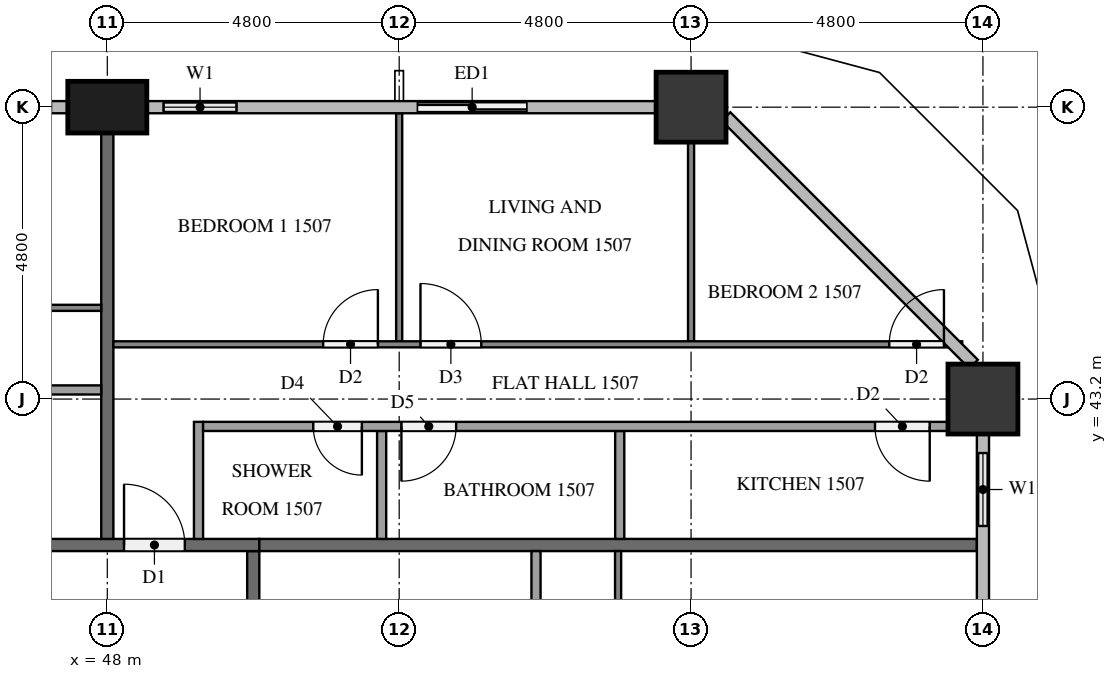
"""IFC4 building model, lengths in metres.
Left out: names, types, materials, properties, quantities, classifications, styles, units other than length and angle.
Written with IfcOpenShell. Run it as: python <this file> out.ifc"""

import sys

from ifc_helpers import new_model, si_unit, direction, frame, frame_2d, origin, origin_2d, place, context, subcontext, project, spatial, rectangle, extrude, element, fill, save


model = new_model("IFC4")
c1 = context("Model", 3, precision=1e-05, world=origin(), true_north=direction((0.0, 1.0)))
c2 = subcontext(c1, "Body", "Model", "MODEL_VIEW")
j1 = project(units=[si_unit("LENGTHUNIT", "METRE"), si_unit("PLANEANGLEUNIT", "RADIAN")], contexts=[c1])
p1 = place(None, origin())
s1 = spatial("IfcSite", under=j1, at=p1, CompositionType="ELEMENT")
p2 = place(p1, origin())
s2 = spatial("IfcBuilding", under=s1, at=p2, CompositionType="ELEMENT")
p3 = place(p2, frame((0.0, 0.0, 62.8)))
s3 = spatial("IfcBuildingStorey", under=s2, at=p3, CompositionType="ELEMENT", Elevation=62.8)
for number, where, z_axis, x_axis in (
    (1, (62.4, 43.2, 0.0), (0.0, 0.0, 1.0), (1.0, 0.0, 0.0)),
    (2, (57.6, 48.0, 0.0), (0.0, 0.0, 1.0), (1.0, 0.0, 0.0)),
):
    element("IfcColumn", number, at=place(p3, frame(where, z_axis=z_axis, x_axis=x_axis)), inside=s3, PredefinedType="COLUMN", context=c2, shape_type="SweptSolid", body=[
        extrude(rectangle(XDim=1.15, YDim=1.15, at=origin_2d()), origin(), (0.0, 0.0, 1.0), 3.2),
    ])
p4 = place(p3, frame((48.0, 48.0, 0.0), z_axis=(0.0, 0.0, 1.0), x_axis=(1.0, 0.0, 0.0)))
e3 = element("IfcColumn", 3, at=p4, inside=s3, PredefinedType="COLUMN", context=c2, shape_type="SweptSolid", body=[
    extrude(rectangle(XDim=1.3, YDim=0.85, at=origin_2d()), origin(), (0.0, 0.0, 1.0), 3.2),
])
p5 = place(p3, frame((62.4, 40.8, 0.0), z_axis=(0.0, 0.0, 1.0), x_axis=(0.0, 1.0, 0.0)))
e4 = element("IfcWall", 4, at=p5, inside=s3, PredefinedType="SOLIDWALL", context=c2, shape_type="SweptSolid", body=[
    extrude(rectangle(XDim=1.825, YDim=0.15, at=frame_2d((0.913, 0.0))), origin(), (0.0, 0.0, 1.0), 3.2),
])
p6 = place(p5, frame((0.312, 0.0, 0.9)))
e5 = element("IfcOpeningElement", 5, at=p6, cuts=e4, PredefinedType="OPENING", context=c2, shape_type="SweptSolid", body=[
    extrude(rectangle(XDim=1.2, YDim=1.4, at=frame_2d((0.6, 0.7))), frame((0.0, 0.085, 0.0), z_axis=(0.0, -1.0, 0.0), x_axis=(1.0, 0.0, 0.0)), (0.0, 0.0, 1.0), 0.17),
])
p7 = place(p3, frame((55.2, 48.0, 0.0), z_axis=(0.0, 0.0, 1.0), x_axis=(-1.0, 0.0, 0.0)))
e6 = element("IfcWall", 6, at=p7, inside=s3, PredefinedType="SOLIDWALL", context=c2, shape_type="SweptSolid", body=[
    extrude(rectangle(XDim=2.4, YDim=0.15, at=frame_2d((1.2, 0.0))), origin(), (0.0, 0.0, 1.0), 3.2),
])
p8 = place(p7, frame((0.3, 0.0, 0.0)))
e7 = element("IfcOpeningElement", 7, at=p8, cuts=e6, PredefinedType="OPENING", context=c2, shape_type="SweptSolid", body=[
    extrude(rectangle(XDim=1.8, YDim=2.4, at=frame_2d((0.9, 1.2))), frame((0.0, 0.085, 0.0), z_axis=(0.0, -1.0, 0.0), x_axis=(1.0, 0.0, 0.0)), (0.0, 0.0, 1.0), 0.17),
])
p9 = place(p3, frame((50.4, 48.0, 0.0), z_axis=(0.0, 0.0, 1.0), x_axis=(-1.0, 0.0, 0.0)))
e8 = element("IfcWall", 8, at=p9, inside=s3, PredefinedType="SOLIDWALL", context=c2, shape_type="SweptSolid", body=[
    extrude(rectangle(XDim=1.75, YDim=0.15, at=frame_2d((0.875, 0.0))), origin(), (0.0, 0.0, 1.0), 3.2),
])
p10 = place(p9, frame((0.275, 0.0, 0.9)))
e9 = element("IfcOpeningElement", 9, at=p10, cuts=e8, PredefinedType="OPENING", context=c2, shape_type="SweptSolid", body=[
    extrude(rectangle(XDim=1.2, YDim=1.4, at=frame_2d((0.6, 0.7))), frame((0.0, 0.085, 0.0), z_axis=(0.0, -1.0, 0.0), x_axis=(1.0, 0.0, 0.0)), (0.0, 0.0, 1.0), 0.17),
])
p11 = place(p3, frame((47.35, 48.0, 0.0), z_axis=(0.0, 0.0, 1.0), x_axis=(-1.0, 0.0, 0.0)))
e10 = element("IfcWall", 10, at=p11, inside=s3, PredefinedType="SOLIDWALL", context=c2, shape_type="SweptSolid", body=[
    extrude(rectangle(XDim=1.75, YDim=0.15, at=frame_2d((0.875, 0.0))), origin(), (0.0, 0.0, 1.0), 3.2),
])
p12 = place(p11, frame((0.275, 0.0, 0.9)))
e11 = element("IfcOpeningElement", 11, at=p12, cuts=e10, PredefinedType="OPENING", context=c2, shape_type="SweptSolid", body=[
    extrude(rectangle(XDim=1.2, YDim=1.4, at=frame_2d((0.6, 0.7))), frame((0.0, 0.085, 0.0), z_axis=(0.0, -1.0, 0.0), x_axis=(1.0, 0.0, 0.0)), (0.0, 0.0, 1.0), 0.17),
])
p13 = place(p3, frame((50.4, 40.7, 0.0), z_axis=(0.0, 0.0, 1.0), x_axis=(0.0, -1.0, 0.0)))
e12 = element("IfcWall", 12, at=p13, inside=s3, PredefinedType="PARTITIONING", context=c2, shape_type="SweptSolid", body=[
    extrude(rectangle(XDim=28.6, YDim=0.2, at=frame_2d((14.3, 0.0))), origin(), (0.0, 0.0, 1.0), 3.2),
])
p14 = place(p13, frame((24.175, 0.0, 0.0)))
e13 = element("IfcOpeningElement", 13, at=p14, cuts=e12, PredefinedType="OPENING", context=c2, shape_type="SweptSolid", body=[
    extrude(rectangle(XDim=1.0, YDim=2.1, at=frame_2d((0.5, 1.05))), frame((0.0, 0.11, 0.0), z_axis=(0.0, -1.0, 0.0), x_axis=(1.0, 0.0, 0.0)), (0.0, 0.0, 1.0), 0.22),
])
p15 = place(p13, frame((22.625, 0.0, 0.0)))
e14 = element("IfcOpeningElement", 14, at=p15, cuts=e12, PredefinedType="OPENING", context=c2, shape_type="SweptSolid", body=[
    extrude(rectangle(XDim=1.0, YDim=2.1, at=frame_2d((0.5, 1.05))), frame((0.0, 0.11, 0.0), z_axis=(0.0, -1.0, 0.0), x_axis=(1.0, 0.0, 0.0)), (0.0, 0.0, 1.0), 0.22),
])
p16 = place(p13, frame((10.625, 0.0, 0.0)))
e15 = element("IfcOpeningElement", 15, at=p16, cuts=e12, PredefinedType="OPENING", context=c2, shape_type="SweptSolid", body=[
    extrude(rectangle(XDim=1.0, YDim=2.1, at=frame_2d((0.5, 1.05))), frame((0.0, 0.11, 0.0), z_axis=(0.0, -1.0, 0.0), x_axis=(1.0, 0.0, 0.0)), (0.0, 0.0, 1.0), 0.22),
])
p17 = place(p3, frame((11.9, 40.8, 0.0), z_axis=(0.0, 0.0, 1.0), x_axis=(1.0, 0.0, 0.0)))
e16 = element("IfcWall", 16, at=p17, inside=s3, PredefinedType="PARTITIONING", context=c2, shape_type="SweptSolid", body=[
    extrude(rectangle(XDim=38.6, YDim=0.2, at=frame_2d((19.3, 0.0))), origin(), (0.0, 0.0, 1.0), 3.2),
])
p18 = place(p17, frame((36.375, 0.0, 0.0)))
e17 = element("IfcOpeningElement", 17, at=p18, cuts=e16, PredefinedType="OPENING", context=c2, shape_type="SweptSolid", body=[
    extrude(rectangle(XDim=1.0, YDim=2.1, at=frame_2d((0.5, 1.05))), frame((0.0, 0.11, 0.0), z_axis=(0.0, -1.0, 0.0), x_axis=(1.0, 0.0, 0.0)), (0.0, 0.0, 1.0), 0.22),
])
p19 = place(p17, frame((17.125, 0.0, 0.0)))
e18 = element("IfcOpeningElement", 18, at=p19, cuts=e16, PredefinedType="OPENING", context=c2, shape_type="SweptSolid", body=[
    extrude(rectangle(XDim=1.1, YDim=2.1, at=frame_2d((0.55, 1.05))), frame((0.0, 0.11, 0.0), z_axis=(0.0, -1.0, 0.0), x_axis=(1.0, 0.0, 0.0)), (0.0, 0.0, 1.0), 0.22),
])
p20 = place(p17, frame((15.625, 0.0, 0.0)))
e19 = element("IfcOpeningElement", 19, at=p20, cuts=e16, PredefinedType="OPENING", context=c2, shape_type="SweptSolid", body=[
    extrude(rectangle(XDim=1.0, YDim=2.1, at=frame_2d((0.5, 1.05))), frame((0.0, 0.11, 0.0), z_axis=(0.0, -1.0, 0.0), x_axis=(1.0, 0.0, 0.0)), (0.0, 0.0, 1.0), 0.22),
])
p21 = place(p17, frame((1.225, 0.0, 0.0)))
e20 = element("IfcOpeningElement", 20, at=p21, cuts=e16, PredefinedType="OPENING", context=c2, shape_type="SweptSolid", body=[
    extrude(rectangle(XDim=1.0, YDim=2.1, at=frame_2d((0.5, 1.05))), frame((0.0, 0.11, 0.0), z_axis=(0.0, -1.0, 0.0), x_axis=(1.0, 0.0, 0.0)), (0.0, 0.0, 1.0), 0.22),
])
p22 = place(p3, frame((50.5, 40.8, 0.0), z_axis=(0.0, 0.0, 1.0), x_axis=(1.0, 0.0, 0.0)))
e21 = element("IfcWall", 21, at=p22, inside=s3, PredefinedType="PARTITIONING", context=c2, shape_type="SweptSolid", body=[
    extrude(rectangle(XDim=11.8, YDim=0.2, at=frame_2d((5.9, 0.0))), origin(), (0.0, 0.0, 1.0), 3.2),
])
p23 = place(p3, frame((48.0, 47.575, 0.0), z_axis=(0.0, 0.0, 1.0), x_axis=(0.0, -1.0, 0.0)))
e22 = element("IfcWall", 22, at=p23, inside=s3, PredefinedType="PARTITIONING", context=c2, shape_type="SweptSolid", body=[
    extrude(rectangle(XDim=6.675, YDim=0.2, at=frame_2d((3.337, 0.0))), origin(), (0.0, 0.0, 1.0), 3.2),
])
p24 = place(p3, frame((56.4, 40.7, 0.0), z_axis=(0.0, 0.0, 1.0), x_axis=(0.0, -1.0, 0.0)))
e23 = element("IfcWall", 23, at=p24, inside=s3, PredefinedType="PARTITIONING", context=c2, shape_type="SweptSolid", body=[
    extrude(rectangle(XDim=11.8, YDim=0.1, at=frame_2d((5.9, 0.0))), origin(), (0.0, 0.0, 1.0), 3.2),
])
p25 = place(p24, frame((5.05, 0.0, 0.0)))
e24 = element("IfcOpeningElement", 24, at=p25, cuts=e23, PredefinedType="OPENING", context=c2, shape_type="SweptSolid", body=[
    extrude(rectangle(XDim=1.0, YDim=2.1, at=frame_2d((0.5, 1.05))), frame((0.0, 0.06, 0.0), z_axis=(0.0, -1.0, 0.0), x_axis=(1.0, 0.0, 0.0)), (0.0, 0.0, 1.0), 0.12),
])
p26 = place(p24, frame((3.45, 0.0, 0.0)))
e25 = element("IfcOpeningElement", 25, at=p26, cuts=e23, PredefinedType="OPENING", context=c2, shape_type="SweptSolid", body=[
    extrude(rectangle(XDim=0.9, YDim=2.1, at=frame_2d((0.45, 1.05))), frame((0.0, 0.06, 0.0), z_axis=(0.0, -1.0, 0.0), x_axis=(1.0, 0.0, 0.0)), (0.0, 0.0, 1.0), 0.12),
])
p27 = place(p3, frame((55.05, 30.375, 0.0), z_axis=(0.0, 0.0, 1.0), x_axis=(0.0, 1.0, 0.0)))
e26 = element("IfcWall", 26, at=p27, inside=s3, PredefinedType="PARTITIONING", context=c2, shape_type="SweptSolid", body=[
    extrude(rectangle(XDim=10.325, YDim=0.15, at=frame_2d((5.163, 0.0))), origin(), (0.0, 0.0, 1.0), 3.2),
])
p28 = place(p27, frame((3.005, 0.0, 0.0)))
e27 = element("IfcOpeningElement", 27, at=p28, cuts=e26, PredefinedType="OPENING", context=c2, shape_type="SweptSolid", body=[
    extrude(rectangle(XDim=0.8, YDim=2.1, at=frame_2d((0.4, 1.05))), frame((0.0, 0.085, 0.0), z_axis=(0.0, -1.0, 0.0), x_axis=(1.0, 0.0, 0.0)), (0.0, 0.0, 1.0), 0.17),
])
p29 = place(p27, frame((4.455, 0.0, 0.0)))
e28 = element("IfcOpeningElement", 28, at=p29, cuts=e26, PredefinedType="OPENING", context=c2, shape_type="SweptSolid", body=[
    extrude(rectangle(XDim=0.9, YDim=2.1, at=frame_2d((0.45, 1.05))), frame((0.0, 0.085, 0.0), z_axis=(0.0, -1.0, 0.0), x_axis=(1.0, 0.0, 0.0)), (0.0, 0.0, 1.0), 0.17),
])
p30 = place(p3, frame((52.8, 44.15, 0.0), z_axis=(0.0, 0.0, 1.0), x_axis=(0.0, 1.0, 0.0)))
e29 = element("IfcWall", 29, at=p30, inside=s3, PredefinedType="PARTITIONING", context=c2, shape_type="SweptSolid", body=[
    extrude(rectangle(XDim=3.75, YDim=0.1, at=frame_2d((1.875, 0.0))), origin(), (0.0, 0.0, 1.0), 3.2),
])
p31 = place(p3, frame((57.6, 44.15, 0.0), z_axis=(0.0, 0.0, 1.0), x_axis=(0.0, 1.0, 0.0)))
e30 = element("IfcWall", 30, at=p31, inside=s3, PredefinedType="PARTITIONING", context=c2, shape_type="SweptSolid", body=[
    extrude(rectangle(XDim=3.275, YDim=0.1, at=frame_2d((1.638, 0.0))), origin(), (0.0, 0.0, 1.0), 3.2),
])
p32 = place(p3, frame((48.1, 44.1, 0.0), z_axis=(0.0, 0.0, 1.0), x_axis=(1.0, 0.0, 0.0)))
e31 = element("IfcWall", 31, at=p32, inside=s3, PredefinedType="PARTITIONING", context=c2, shape_type="SweptSolid", body=[
    extrude(rectangle(XDim=13.959, YDim=0.1, at=frame_2d((6.979, 0.0))), origin(), (0.0, 0.0, 1.0), 3.2),
])
p33 = place(p32, frame((3.45, 0.0, 0.0)))
e32 = element("IfcOpeningElement", 32, at=p33, cuts=e31, PredefinedType="OPENING", context=c2, shape_type="SweptSolid", body=[
    extrude(rectangle(XDim=0.9, YDim=2.1, at=frame_2d((0.45, 1.05))), frame((0.0, 0.06, 0.0), z_axis=(0.0, -1.0, 0.0), x_axis=(1.0, 0.0, 0.0)), (0.0, 0.0, 1.0), 0.12),
])
p34 = place(p32, frame((5.05, 0.0, 0.0)))
e33 = element("IfcOpeningElement", 33, at=p34, cuts=e31, PredefinedType="OPENING", context=c2, shape_type="SweptSolid", body=[
    extrude(rectangle(XDim=1.0, YDim=2.1, at=frame_2d((0.5, 1.05))), frame((0.0, 0.06, 0.0), z_axis=(0.0, -1.0, 0.0), x_axis=(1.0, 0.0, 0.0)), (0.0, 0.0, 1.0), 0.12),
])
p35 = place(p32, frame((12.759, 0.0, 0.0)))
e34 = element("IfcOpeningElement", 34, at=p35, cuts=e31, PredefinedType="OPENING", context=c2, shape_type="SweptSolid", body=[
    extrude(rectangle(XDim=0.9, YDim=2.1, at=frame_2d((0.45, 1.05))), frame((0.0, 0.06, 0.0), z_axis=(0.0, -1.0, 0.0), x_axis=(1.0, 0.0, 0.0)), (0.0, 0.0, 1.0), 0.12),
])
for number, where, z_axis, x_axis in (
    (35, (52.511, 40.9, 0.0), (0.0, 0.0, 1.0), (0.0, 1.0, 0.0)),
    (36, (56.427, 40.9, 0.0), (0.0, 0.0, 1.0), (0.0, 1.0, 0.0)),
):
    element("IfcWall", number, at=place(p3, frame(where, z_axis=z_axis, x_axis=x_axis)), inside=s3, PredefinedType="PARTITIONING", context=c2, shape_type="SweptSolid", body=[
        extrude(rectangle(XDim=1.775, YDim=0.15, at=frame_2d((0.888, 0.0))), origin(), (0.0, 0.0, 1.0), 3.2),
    ])
p36 = place(p3, frame((49.5, 40.9, 0.0), z_axis=(0.0, 0.0, 1.0), x_axis=(0.0, 1.0, 0.0)))
e37 = element("IfcWall", 37, at=p36, inside=s3, PredefinedType="PARTITIONING", context=c2, shape_type="SweptSolid", body=[
    extrude(rectangle(XDim=1.925, YDim=0.15, at=frame_2d((0.962, 0.0))), origin(), (0.0, 0.0, 1.0), 3.2),
])
p37 = place(p3, frame((61.825, 42.75, 0.0), z_axis=(0.0, 0.0, 1.0), x_axis=(-1.0, 0.0, 0.0)))
e38 = element("IfcWall", 38, at=p37, inside=s3, PredefinedType="PARTITIONING", context=c2, shape_type="SweptSolid", body=[
    extrude(rectangle(XDim=12.25, YDim=0.15, at=frame_2d((6.125, 0.0))), origin(), (0.0, 0.0, 1.0), 3.2),
])
p38 = place(p37, frame((9.638, 0.0, 0.0)))
e39 = element("IfcOpeningElement", 39, at=p38, cuts=e38, PredefinedType="OPENING", context=c2, shape_type="SweptSolid", body=[
    extrude(rectangle(XDim=0.8, YDim=2.1, at=frame_2d((0.4, 1.05))), frame((0.0, 0.085, 0.0), z_axis=(0.0, -1.0, 0.0), x_axis=(1.0, 0.0, 0.0)), (0.0, 0.0, 1.0), 0.17),
])
p39 = place(p37, frame((8.088, 0.0, 0.0)))
e40 = element("IfcOpeningElement", 40, at=p39, cuts=e38, PredefinedType="OPENING", context=c2, shape_type="SweptSolid", body=[
    extrude(rectangle(XDim=0.9, YDim=2.1, at=frame_2d((0.45, 1.05))), frame((0.0, 0.085, 0.0), z_axis=(0.0, -1.0, 0.0), x_axis=(1.0, 0.0, 0.0)), (0.0, 0.0, 1.0), 0.17),
])
p40 = place(p37, frame((0.3, 0.0, 0.0)))
e41 = element("IfcOpeningElement", 41, at=p40, cuts=e38, PredefinedType="OPENING", context=c2, shape_type="SweptSolid", body=[
    extrude(rectangle(XDim=0.9, YDim=2.1, at=frame_2d((0.45, 1.05))), frame((0.0, 0.085, 0.0), z_axis=(0.0, -1.0, 0.0), x_axis=(1.0, 0.0, 0.0)), (0.0, 0.0, 1.0), 0.17),
])
p41 = place(p3, frame((28.9, 44.7, 0.0), z_axis=(0.0, 0.0, 1.0), x_axis=(1.0, 0.0, 0.0)))
e42 = element("IfcWall", 42, at=p41, inside=s3, PredefinedType="PARTITIONING", context=c2, shape_type="SweptSolid", body=[
    extrude(rectangle(XDim=19.0, YDim=0.1, at=frame_2d((9.5, 0.0))), origin(), (0.0, 0.0, 1.0), 3.2),
])
p42 = place(p41, frame((3.35, 0.0, 0.0)))
e43 = element("IfcOpeningElement", 43, at=p42, cuts=e42, PredefinedType="OPENING", context=c2, shape_type="SweptSolid", body=[
    extrude(rectangle(XDim=1.0, YDim=2.1, at=frame_2d((0.5, 1.05))), frame((0.0, 0.06, 0.0), z_axis=(0.0, -1.0, 0.0), x_axis=(1.0, 0.0, 0.0)), (0.0, 0.0, 1.0), 0.12),
])
p43 = place(p41, frame((5.05, 0.0, 0.0)))
e44 = element("IfcOpeningElement", 44, at=p43, cuts=e42, PredefinedType="OPENING", context=c2, shape_type="SweptSolid", body=[
    extrude(rectangle(XDim=0.9, YDim=2.1, at=frame_2d((0.45, 1.05))), frame((0.0, 0.06, 0.0), z_axis=(0.0, -1.0, 0.0), x_axis=(1.0, 0.0, 0.0)), (0.0, 0.0, 1.0), 0.12),
])
p44 = place(p41, frame((13.05, 0.0, 0.0)))
e45 = element("IfcOpeningElement", 45, at=p44, cuts=e42, PredefinedType="OPENING", context=c2, shape_type="SweptSolid", body=[
    extrude(rectangle(XDim=0.9, YDim=2.1, at=frame_2d((0.45, 1.05))), frame((0.0, 0.06, 0.0), z_axis=(0.0, -1.0, 0.0), x_axis=(1.0, 0.0, 0.0)), (0.0, 0.0, 1.0), 0.12),
])
p45 = place(p41, frame((14.65, 0.0, 0.0)))
e46 = element("IfcOpeningElement", 46, at=p45, cuts=e42, PredefinedType="OPENING", context=c2, shape_type="SweptSolid", body=[
    extrude(rectangle(XDim=0.9, YDim=2.1, at=frame_2d((0.45, 1.05))), frame((0.0, 0.06, 0.0), z_axis=(0.0, -1.0, 0.0), x_axis=(1.0, 0.0, 0.0)), (0.0, 0.0, 1.0), 0.12),
])
p46 = place(p3, frame((47.9, 43.35, 0.0), z_axis=(0.0, 0.0, 1.0), x_axis=(-1.0, 0.0, 0.0)))
e47 = element("IfcWall", 47, at=p46, inside=s3, PredefinedType="PARTITIONING", context=c2, shape_type="SweptSolid", body=[
    extrude(rectangle(XDim=17.525, YDim=0.15, at=frame_2d((8.762, 0.0))), origin(), (0.0, 0.0, 1.0), 3.2),
])
p47 = place(p46, frame((14.564, 0.0, 0.0)))
e48 = element("IfcOpeningElement", 48, at=p47, cuts=e47, PredefinedType="OPENING", context=c2, shape_type="SweptSolid", body=[
    extrude(rectangle(XDim=0.8, YDim=2.1, at=frame_2d((0.4, 1.05))), frame((0.0, 0.085, 0.0), z_axis=(0.0, -1.0, 0.0), x_axis=(1.0, 0.0, 0.0)), (0.0, 0.0, 1.0), 0.17),
])
p48 = place(p46, frame((13.114, 0.0, 0.0)))
e49 = element("IfcOpeningElement", 49, at=p48, cuts=e47, PredefinedType="OPENING", context=c2, shape_type="SweptSolid", body=[
    extrude(rectangle(XDim=0.8, YDim=2.1, at=frame_2d((0.4, 1.05))), frame((0.0, 0.085, 0.0), z_axis=(0.0, -1.0, 0.0), x_axis=(1.0, 0.0, 0.0)), (0.0, 0.0, 1.0), 0.17),
])
p49 = place(p46, frame((4.706, 0.0, 0.0)))
e50 = element("IfcOpeningElement", 50, at=p49, cuts=e47, PredefinedType="OPENING", context=c2, shape_type="SweptSolid", body=[
    extrude(rectangle(XDim=0.9, YDim=2.1, at=frame_2d((0.45, 1.05))), frame((0.0, 0.085, 0.0), z_axis=(0.0, -1.0, 0.0), x_axis=(1.0, 0.0, 0.0)), (0.0, 0.0, 1.0), 0.17),
])
p50 = place(p46, frame((3.156, 0.0, 0.0)))
e51 = element("IfcOpeningElement", 51, at=p50, cuts=e47, PredefinedType="OPENING", context=c2, shape_type="SweptSolid", body=[
    extrude(rectangle(XDim=0.9, YDim=2.1, at=frame_2d((0.45, 1.05))), frame((0.0, 0.085, 0.0), z_axis=(0.0, -1.0, 0.0), x_axis=(1.0, 0.0, 0.0)), (0.0, 0.0, 1.0), 0.17),
])
p51 = place(p6, origin())
e52 = element("IfcWindow", 52, at=p51, inside=s3, PartitioningType="SINGLE_PANEL", PredefinedType="WINDOW", context=c2, shape_type="SweptSolid", body=[
    extrude(rectangle(XDim=1.2, YDim=1.4, at=frame_2d((0.6, 0.7))), frame((0.0, 0.03, 0.0), z_axis=(0.0, -1.0, 0.0), x_axis=(1.0, 0.0, 0.0)), (0.0, 0.0, 1.0), 0.06),
])
fill(e5, e52)
p52 = place(p8, origin())
e53 = element("IfcDoor", 53, at=p52, inside=s3, OperationType="SLIDING_TO_RIGHT", PredefinedType="DOOR", context=c2, shape_type="SweptSolid", body=[
    extrude(rectangle(XDim=1.8, YDim=2.4, at=frame_2d((0.9, 1.2))), frame((0.0, 0.025, 0.0), z_axis=(0.0, -1.0, 0.0), x_axis=(1.0, 0.0, 0.0)), (0.0, 0.0, 1.0), 0.05),
])
fill(e7, e53)
p53 = place(p10, origin())
e54 = element("IfcWindow", 54, at=p53, inside=s3, PartitioningType="SINGLE_PANEL", PredefinedType="WINDOW", context=c2, shape_type="SweptSolid", body=[
    extrude(rectangle(XDim=1.2, YDim=1.4, at=frame_2d((0.6, 0.7))), frame((0.0, 0.03, 0.0), z_axis=(0.0, -1.0, 0.0), x_axis=(1.0, 0.0, 0.0)), (0.0, 0.0, 1.0), 0.06),
])
fill(e9, e54)
p54 = place(p18, origin())
e55 = element("IfcDoor", 55, at=p54, inside=s3, OperationType="SINGLE_SWING_LEFT", PredefinedType="DOOR", context=c2, shape_type="SweptSolid", body=[
    extrude(rectangle(XDim=1.0, YDim=2.1, at=frame_2d((0.5, 1.05))), frame((0.0, 0.025, 0.0), z_axis=(0.0, -1.0, 0.0), x_axis=(1.0, 0.0, 0.0)), (0.0, 0.0, 1.0), 0.05),
])
fill(e17, e55)
p55 = place(p33, origin())
e56 = element("IfcDoor", 56, at=p55, inside=s3, OperationType="SINGLE_SWING_RIGHT", PredefinedType="DOOR", context=c2, shape_type="SweptSolid", body=[
    extrude(rectangle(XDim=0.9, YDim=2.1, at=frame_2d((0.45, 1.05))), frame((0.0, 0.025, 0.0), z_axis=(0.0, -1.0, 0.0), x_axis=(1.0, 0.0, 0.0)), (0.0, 0.0, 1.0), 0.05),
])
fill(e32, e56)
p56 = place(p34, origin())
e57 = element("IfcDoor", 57, at=p56, inside=s3, OperationType="SINGLE_SWING_LEFT", PredefinedType="DOOR", context=c2, shape_type="SweptSolid", body=[
    extrude(rectangle(XDim=1.0, YDim=2.1, at=frame_2d((0.5, 1.05))), frame((0.0, 0.025, 0.0), z_axis=(0.0, -1.0, 0.0), x_axis=(1.0, 0.0, 0.0)), (0.0, 0.0, 1.0), 0.05),
])
fill(e33, e57)
p57 = place(p35, origin())
e58 = element("IfcDoor", 58, at=p57, inside=s3, OperationType="SINGLE_SWING_RIGHT", PredefinedType="DOOR", context=c2, shape_type="SweptSolid", body=[
    extrude(rectangle(XDim=0.9, YDim=2.1, at=frame_2d((0.45, 1.05))), frame((0.0, 0.025, 0.0), z_axis=(0.0, -1.0, 0.0), x_axis=(1.0, 0.0, 0.0)), (0.0, 0.0, 1.0), 0.05),
])
fill(e34, e58)
p58 = place(p38, origin())
e59 = element("IfcDoor", 59, at=p58, inside=s3, OperationType="SINGLE_SWING_LEFT", PredefinedType="DOOR", context=c2, shape_type="SweptSolid", body=[
    extrude(rectangle(XDim=0.8, YDim=2.1, at=frame_2d((0.4, 1.05))), frame((0.0, 0.025, 0.0), z_axis=(0.0, -1.0, 0.0), x_axis=(1.0, 0.0, 0.0)), (0.0, 0.0, 1.0), 0.05),
])
fill(e39, e59)
p59 = place(p39, origin())
e60 = element("IfcDoor", 60, at=p59, inside=s3, OperationType="SINGLE_SWING_RIGHT", PredefinedType="DOOR", context=c2, shape_type="SweptSolid", body=[
    extrude(rectangle(XDim=0.9, YDim=2.1, at=frame_2d((0.45, 1.05))), frame((0.0, 0.025, 0.0), z_axis=(0.0, -1.0, 0.0), x_axis=(1.0, 0.0, 0.0)), (0.0, 0.0, 1.0), 0.05),
])
fill(e40, e60)
p60 = place(p40, origin())
e61 = element("IfcDoor", 61, at=p60, inside=s3, OperationType="SINGLE_SWING_LEFT", PredefinedType="DOOR", context=c2, shape_type="SweptSolid", body=[
    extrude(rectangle(XDim=0.9, YDim=2.1, at=frame_2d((0.45, 1.05))), frame((0.0, 0.025, 0.0), z_axis=(0.0, -1.0, 0.0), x_axis=(1.0, 0.0, 0.0)), (0.0, 0.0, 1.0), 0.05),
])
fill(e41, e61)
save(model, sys.argv[1])
